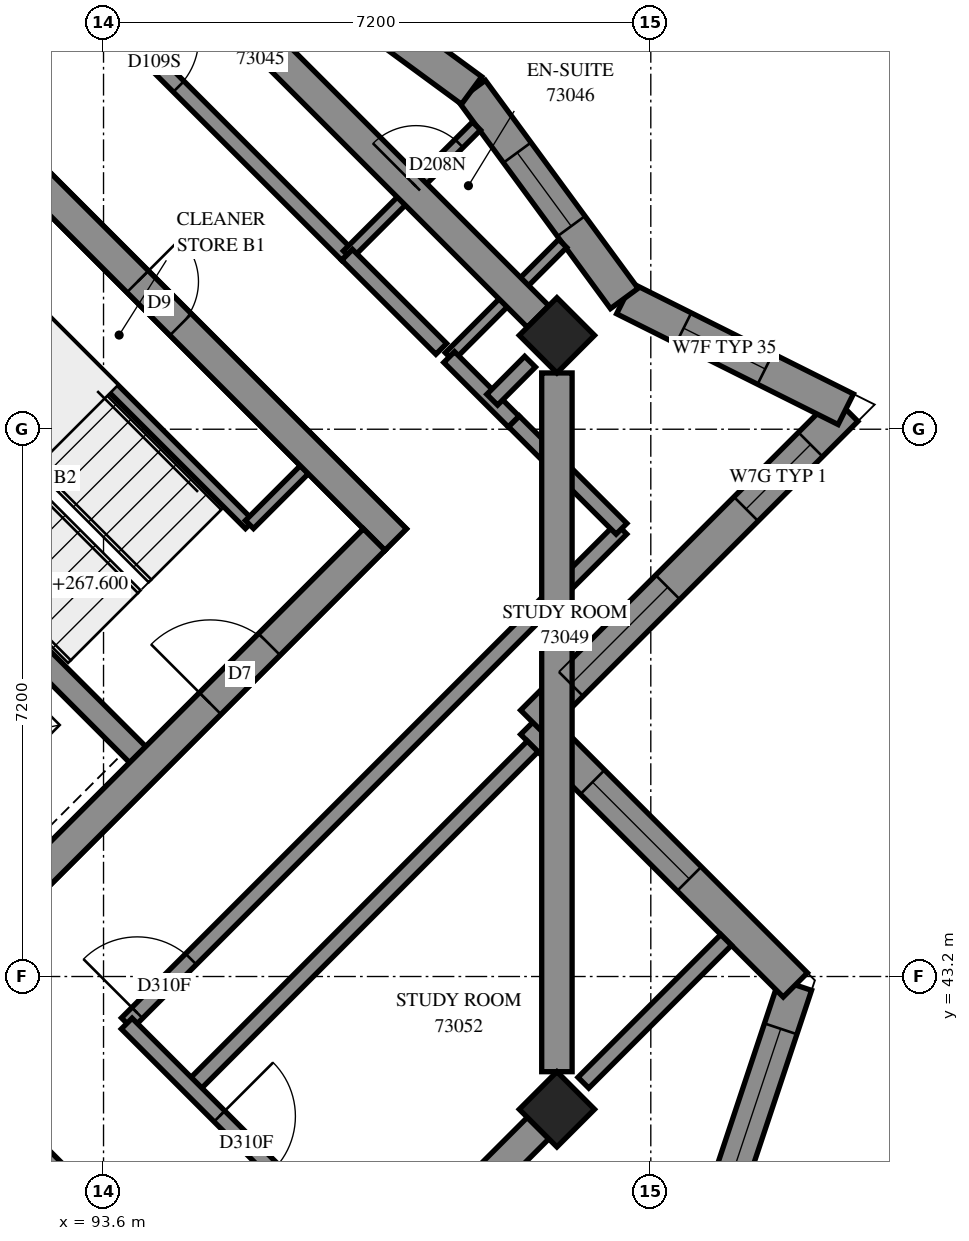
"""IFC4 building model, lengths in metres.
Left out: names, types, materials, properties, quantities, classifications, styles, units other than length and angle.
Written with IfcOpenShell. Run it as: python <this file> out.ifc"""

import sys

from ifc_helpers import new_model, si_unit, direction, frame, frame_2d, origin, origin_2d, place, context, subcontext, project, spatial, polyline, rectangle, outline, extrude, element, fill, save


model = new_model("IFC4")
c1 = context("Model", 3, precision=1e-05, world=origin(), true_north=direction((0.0, 1.0)))
c2 = subcontext(c1, "Body", "Model", "MODEL_VIEW")
j1 = project(units=[si_unit("LENGTHUNIT", "METRE"), si_unit("PLANEANGLEUNIT", "RADIAN")], contexts=[c1])
p1 = place(None, origin())
s1 = spatial("IfcSite", under=j1, at=p1, CompositionType="ELEMENT")
p2 = place(p1, origin())
s2 = spatial("IfcBuilding", under=s1, at=p2, CompositionType="ELEMENT")
p3 = place(p2, frame((0.0, 0.0, 267.6)))
s3 = spatial("IfcBuildingStorey", under=s2, at=p3, CompositionType="ELEMENT", Elevation=267.6)
for number, where, z_axis, x_axis in (
    (1, (99.565, 51.635, 0.0), (0.0, 0.0, 1.0), (0.707, -0.707, 0.0)),
    (2, (99.565, 41.453, 0.0), (0.0, 0.0, 1.0), (0.707, -0.707, 0.0)),
):
    element("IfcColumn", number, at=place(p3, frame(where, z_axis=z_axis, x_axis=x_axis)), inside=s3, PredefinedType="COLUMN", context=c2, shape_type="SweptSolid", body=[
        extrude(rectangle(XDim=0.7, YDim=0.7, at=origin_2d()), origin(), (0.0, 0.0, 1.0), 3.1),
    ])
p4 = place(p3, frame((86.695, 59.696, -0.3), z_axis=(0.0, 0.0, 1.0), x_axis=(0.7071100706, -0.7071034917, 0.0)))
e3 = element("IfcWall", 3, at=p4, inside=s3, PredefinedType="SHEAR", context=c2, shape_type="SweptSolid", body=[
    extrude(rectangle(XDim=15.2, YDim=0.4, at=frame_2d((7.6, 0.0))), origin(), (0.0, 0.0, 1.0), 2.7),
])
p5 = place(p4, frame((10.4, 0.0, 0.3)))
e4 = element("IfcOpeningElement", 4, at=p5, cuts=e3, PredefinedType="OPENING", context=c2, shape_type="SweptSolid", body=[
    extrude(rectangle(XDim=0.8, YDim=2.1, at=frame_2d((0.4, 1.05))), frame((0.0, 0.21, 0.0), z_axis=(0.0, -1.0, 0.0), x_axis=(1.0, 0.0, 0.0)), (0.0, 0.0, 1.0), 0.42),
])
p6 = place(p3, frame((86.978, 38.766, -0.3), z_axis=(0.0, 0.0, 1.0), x_axis=(0.7071067812, 0.7071067812, 0.0)))
e5 = element("IfcWall", 5, at=p6, inside=s3, PredefinedType="SHEAR", context=c2, shape_type="SweptSolid", body=[
    extrude(rectangle(XDim=14.4, YDim=0.4, at=frame_2d((7.2, 0.0))), origin(), (0.0, 0.0, 1.0), 2.7),
])
p7 = place(p6, frame((4.55, 0.0, 0.3)))
e6 = element("IfcOpeningElement", 6, at=p7, cuts=e5, PredefinedType="OPENING", context=c2, shape_type="SweptSolid", body=[
    extrude(rectangle(XDim=1.1, YDim=2.1, at=frame_2d((0.55, 1.05))), frame((0.0, 0.21, 0.0), z_axis=(0.0, -1.0, 0.0), x_axis=(1.0, 0.0, 0.0)), (0.0, 0.0, 1.0), 0.42),
])
p8 = place(p6, frame((11.35, 0.0, 0.3)))
e7 = element("IfcOpeningElement", 7, at=p8, cuts=e5, PredefinedType="OPENING", context=c2, shape_type="SweptSolid", body=[
    extrude(rectangle(XDim=1.1, YDim=2.1, at=frame_2d((0.55, 1.05))), frame((0.0, 0.21, 0.0), z_axis=(0.0, -1.0, 0.0), x_axis=(1.0, 0.0, 0.0)), (0.0, 0.0, 1.0), 0.42),
])
p9 = place(p3, frame((88.958, 51.211, 0.0), z_axis=(0.0, 0.0, 1.0), x_axis=(0.7070998367, -0.7071137256, 0.0)))
e8 = element("IfcWall", 8, at=p9, inside=s3, PredefinedType="SOLIDWALL", context=c2, shape_type="SweptSolid", body=[
    extrude(rectangle(XDim=7.2, YDim=0.3, at=frame_2d((3.6, 0.0))), origin(), (0.0, 0.0, 1.0), 3.1),
])
p10 = place(p3, frame((101.082, 38.232, 0.0), z_axis=(0.0, 0.0, 1.0), x_axis=(0.316227766, 0.9486832981, 0.0)))
e9 = element("IfcWall", 9, at=p10, inside=s3, PredefinedType="SOLIDWALL", context=c2, shape_type="SweptSolid", body=[
    extrude(outline(polyline([(-0.108, -0.225), (5.259, -0.225), (4.981, 0.225), (0.108, 0.225), (-0.108, -0.225)])), origin(), (0.0, 0.0, 1.0), 3.1),
])
p11 = place(p10, frame((1.711, 0.0, 0.45)))
e10 = element("IfcOpeningElement", 10, at=p11, cuts=e9, PredefinedType="OPENING", context=c2, shape_type="SweptSolid", body=[
    extrude(rectangle(XDim=2.8, YDim=2.55, at=frame_2d((1.4, 1.275))), frame((0.0, 0.235, 0.0), z_axis=(0.0, -1.0, 0.0), x_axis=(1.0, 0.0, 0.0)), (0.0, 0.0, 1.0), 0.47),
])
p12 = place(p3, frame((102.701, 43.089, 0.0), z_axis=(0.0, 0.0, 1.0), x_axis=(-0.7070965479, 0.7071170144, 0.0)))
e11 = element("IfcWall", 11, at=p12, inside=s3, PredefinedType="SOLIDWALL", context=c2, shape_type="SweptSolid", body=[
    extrude(outline(polyline([(-0.139, -0.225), (4.661, -0.225), (5.111, 0.225), (0.139, 0.225), (-0.139, -0.225)])), origin(), (0.0, 0.0, 1.0), 3.1),
])
p13 = place(p12, frame((1.974, 0.0, 0.6)))
e12 = element("IfcOpeningElement", 12, at=p13, cuts=e11, PredefinedType="OPENING", context=c2, shape_type="SweptSolid", body=[
    extrude(rectangle(XDim=1.8, YDim=1.9, at=frame_2d((0.9, 0.95))), frame((0.0, 0.235, 0.0), z_axis=(0.0, -1.0, 0.0), x_axis=(1.0, 0.0, 0.0)), (0.0, 0.0, 1.0), 0.47),
])
p14 = place(p3, frame((99.246, 46.544, 0.0), z_axis=(0.0, 0.0, 1.0), x_axis=(0.7071067812, 0.7071067812, 0.0)))
e13 = element("IfcWall", 13, at=p14, inside=s3, PredefinedType="SOLIDWALL", context=c2, shape_type="SweptSolid", body=[
    extrude(outline(polyline([(0.225, -0.225), (6.137, -0.225), (5.513, 0.225), (-0.225, 0.225), (0.225, -0.225)])), origin(), (0.0, 0.0, 1.0), 3.1),
])
p15 = place(p14, frame((0.713, 0.0, 0.6)))
e14 = element("IfcOpeningElement", 14, at=p15, cuts=e13, PredefinedType="OPENING", context=c2, shape_type="SweptSolid", body=[
    extrude(rectangle(XDim=1.8, YDim=1.9, at=frame_2d((0.9, 0.95))), frame((0.0, 0.235, 0.0), z_axis=(0.0, -1.0, 0.0), x_axis=(1.0, 0.0, 0.0)), (0.0, 0.0, 1.0), 0.47),
])
p16 = place(p14, frame((3.969, 0.0, 0.6)))
e15 = element("IfcOpeningElement", 15, at=p16, cuts=e13, PredefinedType="OPENING", context=c2, shape_type="SweptSolid", body=[
    extrude(rectangle(XDim=1.2, YDim=1.9, at=frame_2d((0.6, 0.95))), frame((0.0, 0.235, 0.0), z_axis=(0.0, -1.0, 0.0), x_axis=(1.0, 0.0, 0.0)), (0.0, 0.0, 1.0), 0.47),
])
p17 = place(p3, frame((103.365, 50.663, 0.0), z_axis=(0.0, 0.0, 1.0), x_axis=(-0.8944456039, 0.4471767677, 0.0)))
e16 = element("IfcWall", 16, at=p17, inside=s3, PredefinedType="SOLIDWALL", context=c2, shape_type="SweptSolid", body=[
    extrude(outline(polyline([(-0.312, -0.225), (3.204, -0.225), (3.313, 0.225), (0.312, 0.225), (-0.312, -0.225)])), origin(), (0.0, 0.0, 1.0), 3.1),
])
p18 = place(p17, frame((1.185, 0.0, 0.45)))
e17 = element("IfcOpeningElement", 17, at=p18, cuts=e16, PredefinedType="OPENING", context=c2, shape_type="SweptSolid", body=[
    extrude(rectangle(XDim=1.2, YDim=2.55, at=frame_2d((0.6, 1.275))), frame((0.0, 0.235, 0.0), z_axis=(0.0, -1.0, 0.0), x_axis=(1.0, 0.0, 0.0)), (0.0, 0.0, 1.0), 0.47),
])
p19 = place(p3, frame((100.451, 52.12, 0.0), z_axis=(0.0, 0.0, 1.0), x_axis=(-0.5916343714, 0.8062064069, 0.0)))
e18 = element("IfcWall", 18, at=p19, inside=s3, PredefinedType="SOLIDWALL", context=c2, shape_type="SweptSolid", body=[
    extrude(outline(polyline([(0.054, -0.225), (3.429, -0.225), (3.36, 0.225), (-0.054, 0.225), (0.054, -0.225)])), origin(), (0.0, 0.0, 1.0), 3.1),
])
p20 = place(p19, frame((1.18, 0.0, 0.45)))
e19 = element("IfcOpeningElement", 19, at=p20, cuts=e18, PredefinedType="OPENING", context=c2, shape_type="SweptSolid", body=[
    extrude(rectangle(XDim=1.2, YDim=2.55, at=frame_2d((0.6, 1.275))), frame((0.0, 0.235, 0.0), z_axis=(0.0, -1.0, 0.0), x_axis=(1.0, 0.0, 0.0)), (0.0, 0.0, 1.0), 0.47),
])
p21 = place(p3, frame((98.442, 54.857, 0.0), z_axis=(0.0, 0.0, 1.0), x_axis=(-0.806200528, 0.5916423825, 0.0)))
e20 = element("IfcWall", 20, at=p21, inside=s3, PredefinedType="SOLIDWALL", context=c2, shape_type="SweptSolid", body=[
    extrude(outline(polyline([(-0.035, -0.225), (3.34, -0.225), (3.409, 0.225), (0.035, 0.225), (-0.035, -0.225)])), origin(), (0.0, 0.0, 1.0), 3.1),
])
p22 = place(p21, frame((1.255, 0.0, 0.45)))
e21 = element("IfcOpeningElement", 21, at=p22, cuts=e20, PredefinedType="OPENING", context=c2, shape_type="SweptSolid", body=[
    extrude(rectangle(XDim=1.2, YDim=2.55, at=frame_2d((0.6, 1.275))), frame((0.0, 0.235, 0.0), z_axis=(0.0, -1.0, 0.0), x_axis=(1.0, 0.0, 0.0)), (0.0, 0.0, 1.0), 0.47),
])
p23 = place(p3, frame((91.313, 53.354, 0.0), z_axis=(0.0, 0.0, 1.0), x_axis=(0.7071067812, -0.7071067812, 0.0)))
e22 = element("IfcWall", 22, at=p23, inside=s3, PredefinedType="PARTITIONING", context=c2, shape_type="SweptSolid", body=[
    extrude(rectangle(XDim=5.95, YDim=0.15, at=frame_2d((2.975, 0.0))), origin(), (0.0, 0.0, 1.0), 3.1),
])
p24 = place(p3, frame((95.52, 49.146, 0.0), z_axis=(0.0, 0.0, 1.0), x_axis=(0.7071067812, 0.7071067812, 0.0)))
e23 = element("IfcWall", 23, at=p24, inside=s3, PredefinedType="PARTITIONING", context=c2, shape_type="SweptSolid", body=[
    extrude(rectangle(XDim=1.02, YDim=0.15, at=frame_2d((0.51, 0.0))), origin(), (0.0, 0.0, 1.0), 3.1),
])
p25 = place(p3, frame((93.907, 42.585, 0.0), z_axis=(0.0, 0.0, 1.0), x_axis=(0.7071067812, 0.7071067812, 0.0)))
e24 = element("IfcWall", 24, at=p25, inside=s3, PredefinedType="PARTITIONING", context=c2, shape_type="SweptSolid", body=[
    extrude(rectangle(XDim=9.201, YDim=0.2, at=frame_2d((4.601, 0.0))), origin(), (0.0, 0.0, 1.0), 3.1),
])
p26 = place(p25, frame((0.193, 0.0, 0.0)))
e25 = element("IfcOpeningElement", 25, at=p26, cuts=e24, PredefinedType="OPENING", context=c2, shape_type="SweptSolid", body=[
    extrude(rectangle(XDim=1.0, YDim=2.1, at=frame_2d((0.5, 1.05))), frame((0.0, 0.11, 0.0), z_axis=(0.0, -1.0, 0.0), x_axis=(1.0, 0.0, 0.0)), (0.0, 0.0, 1.0), 0.22),
])
p27 = place(p3, frame((94.755, 41.737, 0.0), z_axis=(0.0, 0.0, 1.0), x_axis=(0.7071146549, 0.7070989073, 0.0)))
e26 = element("IfcWall", 26, at=p27, inside=s3, PredefinedType="PARTITIONING", context=c2, shape_type="SweptSolid", body=[
    extrude(rectangle(XDim=6.35, YDim=0.2, at=frame_2d((3.175, 0.0))), origin(), (0.0, 0.0, 1.0), 3.1),
])
p28 = place(p3, frame((93.905, 42.581, 0.0), z_axis=(0.0, 0.0, 1.0), x_axis=(0.7071067812, -0.7071067812, 0.0)))
e27 = element("IfcWall", 27, at=p28, inside=s3, PredefinedType="PARTITIONING", context=c2, shape_type="SweptSolid", body=[
    extrude(rectangle(XDim=4.8, YDim=0.2, at=frame_2d((2.4, 0.0))), origin(), (0.0, 0.0, 1.0), 3.1),
])
p29 = place(p28, frame((1.725, 0.0, 0.0)))
e28 = element("IfcOpeningElement", 28, at=p29, cuts=e27, PredefinedType="OPENING", context=c2, shape_type="SweptSolid", body=[
    extrude(rectangle(XDim=1.0, YDim=2.1, at=frame_2d((0.5, 1.05))), frame((0.0, 0.11, 0.0), z_axis=(0.0, -1.0, 0.0), x_axis=(1.0, 0.0, 0.0)), (0.0, 0.0, 1.0), 0.22),
])
p30 = place(p3, frame((92.491, 41.167, 0.0), z_axis=(0.0, 0.0, 1.0), x_axis=(0.7071067812, -0.7071067812, 0.0)))
e29 = element("IfcWall", 29, at=p30, inside=s3, PredefinedType="PARTITIONING", context=c2, shape_type="SweptSolid", body=[
    extrude(rectangle(XDim=4.8, YDim=0.2, at=frame_2d((2.4, 0.0))), origin(), (0.0, 0.0, 1.0), 3.1),
])
p31 = place(p30, frame((1.725, 0.0, 0.0)))
e30 = element("IfcOpeningElement", 30, at=p31, cuts=e29, PredefinedType="OPENING", context=c2, shape_type="SweptSolid", body=[
    extrude(rectangle(XDim=1.0, YDim=2.1, at=frame_2d((0.5, 1.05))), frame((0.0, 0.11, 0.0), z_axis=(0.0, -1.0, 0.0), x_axis=(1.0, 0.0, 0.0)), (0.0, 0.0, 1.0), 0.22),
])
p32 = place(p3, frame((93.621, 55.875, 0.0), z_axis=(0.0, 0.0, 1.0), x_axis=(0.7071067812, -0.7071067812, 0.0)))
e31 = element("IfcWall", 31, at=p32, inside=s3, PredefinedType="PARTITIONING", context=c2, shape_type="SweptSolid", body=[
    extrude(rectangle(XDim=4.5, YDim=0.2, at=frame_2d((2.25, 0.0))), origin(), (0.0, 0.0, 1.0), 3.1),
])
p33 = place(p32, frame((0.467, 0.0, 0.0)))
e32 = element("IfcOpeningElement", 32, at=p33, cuts=e31, PredefinedType="OPENING", context=c2, shape_type="SweptSolid", body=[
    extrude(rectangle(XDim=0.9, YDim=2.1, at=frame_2d((0.45, 1.05))), frame((0.0, 0.11, 0.0), z_axis=(0.0, -1.0, 0.0), x_axis=(1.0, 0.0, 0.0)), (0.0, 0.0, 1.0), 0.22),
])
p34 = place(p3, frame((97.301, 39.191, 0.0), z_axis=(0.0, 0.0, 1.0), x_axis=(0.7071067812, 0.7071067812, 0.0)))
e33 = element("IfcWall", 33, at=p34, inside=s3, PredefinedType="PARTITIONING", context=c2, shape_type="SweptSolid", body=[
    extrude(rectangle(XDim=2.707, YDim=0.2, at=frame_2d((1.353, 0.0))), origin(), (0.0, 0.0, 1.0), 2.6),
])
p35 = place(p3, frame((99.913, 41.803, 0.0), z_axis=(0.0, 0.0, 1.0), x_axis=(0.7071067812, 0.7071067812, 0.0)))
e34 = element("IfcWall", 34, at=p35, inside=s3, PredefinedType="PARTITIONING", context=c2, shape_type="SweptSolid", body=[
    extrude(rectangle(XDim=2.656, YDim=0.2, at=frame_2d((1.328, 0.0))), origin(), (0.0, 0.0, 1.0), 3.1),
])
p36 = place(p3, frame((96.809, 52.693, 0.0), z_axis=(0.0, 0.0, 1.0), x_axis=(0.7075441989, 0.7066690927, 0.0)))
e35 = element("IfcWall", 35, at=p36, inside=s3, PredefinedType="PARTITIONING", context=c2, shape_type="SweptSolid", body=[
    extrude(rectangle(XDim=2.4, YDim=0.15, at=frame_2d((1.2, 0.0))), origin(), (0.0, 0.0, 1.0), 3.1),
])
p37 = place(p36, frame((1.275, 0.0, 0.0)))
e36 = element("IfcOpeningElement", 36, at=p37, cuts=e35, PredefinedType="OPENING", context=c2, shape_type="SweptSolid", body=[
    extrude(rectangle(XDim=0.8, YDim=2.1, at=frame_2d((0.4, 1.05))), frame((0.0, 0.085, 0.0), z_axis=(0.0, -1.0, 0.0), x_axis=(1.0, 0.0, 0.0)), (0.0, 0.0, 1.0), 0.17),
])
p38 = place(p3, frame((98.149, 51.353, 0.0), z_axis=(0.0, 0.0, 1.0), x_axis=(0.7070830723, 0.7071304893, 0.0)))
e37 = element("IfcWall", 37, at=p38, inside=s3, PredefinedType="PARTITIONING", context=c2, shape_type="SweptSolid", body=[
    extrude(rectangle(XDim=2.109, YDim=0.15, at=frame_2d((1.054, 0.0))), origin(), (0.0, 0.0, 1.0), 3.1),
])
p39 = place(p3, frame((98.998, 50.504, 0.0), z_axis=(0.0, 0.0, 1.0), x_axis=(0.7076063266, -0.7066068826, 0.0)))
e38 = element("IfcWall", 38, at=p39, inside=s3, PredefinedType="PARTITIONING", context=c2, shape_type="SweptSolid", body=[
    extrude(rectangle(XDim=2.001, YDim=0.2, at=frame_2d((1.001, 0.0))), origin(), (0.0, 0.0, 1.0), 3.1),
])
p40 = place(p3, frame((96.805, 52.695, 0.0), z_axis=(0.0, 0.0, 1.0), x_axis=(0.7073923078, -0.7068211392, 0.0)))
e39 = element("IfcWall", 39, at=p40, inside=s3, PredefinedType="PARTITIONING", context=c2, shape_type="SweptSolid", body=[
    extrude(rectangle(XDim=1.751, YDim=0.2, at=frame_2d((0.875, 0.0))), origin(), (0.0, 0.0, 1.0), 3.1),
])
p41 = place(p3, frame((98.147, 51.349, 0.0), z_axis=(0.0, 0.0, 1.0), x_axis=(0.7071067812, -0.7071067812, 0.0)))
e40 = element("IfcWall", 40, at=p41, inside=s3, PredefinedType="PARTITIONING", context=c2, shape_type="SweptSolid", body=[
    extrude(rectangle(XDim=1.199, YDim=0.2, at=frame_2d((0.6, 0.0))), origin(), (0.0, 0.0, 1.0), 3.1),
])
p42 = place(p3, frame((98.714, 50.788, 0.0), z_axis=(0.0, 0.0, 1.0), x_axis=(0.7056883165, 0.7085224061, 0.0)))
e41 = element("IfcWall", 41, at=p42, inside=s3, PredefinedType="PARTITIONING", context=c2, shape_type="SweptSolid", body=[
    extrude(rectangle(XDim=0.706, YDim=0.2, at=frame_2d((0.353, 0.0))), origin(), (0.0, 0.0, 1.0), 3.1),
])
p43 = place(p11, origin())
e42 = element("IfcWindow", 42, at=p43, inside=s3, PartitioningType="SINGLE_PANEL", PredefinedType="WINDOW", context=c2, shape_type="SweptSolid", body=[
    extrude(rectangle(XDim=2.8, YDim=2.55, at=frame_2d((1.4, 1.275))), frame((0.0, 0.205, 0.0), z_axis=(0.0, -1.0, 0.0), x_axis=(1.0, 0.0, 0.0)), (0.0, 0.0, 1.0), 0.06),
])
fill(e10, e42)
p44 = place(p13, origin())
e43 = element("IfcWindow", 43, at=p44, inside=s3, PartitioningType="SINGLE_PANEL", PredefinedType="WINDOW", context=c2, shape_type="SweptSolid", body=[
    extrude(rectangle(XDim=1.8, YDim=1.9, at=frame_2d((0.9, 0.95))), frame((0.0, 0.205, 0.0), z_axis=(0.0, -1.0, 0.0), x_axis=(1.0, 0.0, 0.0)), (0.0, 0.0, 1.0), 0.06),
])
fill(e12, e43)
p45 = place(p15, origin())
e44 = element("IfcWindow", 44, at=p45, inside=s3, PartitioningType="SINGLE_PANEL", PredefinedType="WINDOW", context=c2, shape_type="SweptSolid", body=[
    extrude(rectangle(XDim=1.8, YDim=1.9, at=frame_2d((0.9, 0.95))), frame((0.0, 0.205, 0.0), z_axis=(0.0, -1.0, 0.0), x_axis=(1.0, 0.0, 0.0)), (0.0, 0.0, 1.0), 0.06),
])
fill(e14, e44)
p46 = place(p16, origin())
e45 = element("IfcWindow", 45, at=p46, inside=s3, PartitioningType="SINGLE_PANEL", PredefinedType="WINDOW", context=c2, shape_type="SweptSolid", body=[
    extrude(rectangle(XDim=1.2, YDim=1.9, at=frame_2d((0.6, 0.95))), frame((0.0, 0.205, 0.0), z_axis=(0.0, -1.0, 0.0), x_axis=(1.0, 0.0, 0.0)), (0.0, 0.0, 1.0), 0.06),
])
fill(e15, e45)
p47 = place(p18, origin())
e46 = element("IfcWindow", 46, at=p47, inside=s3, PartitioningType="SINGLE_PANEL", PredefinedType="WINDOW", context=c2, shape_type="SweptSolid", body=[
    extrude(rectangle(XDim=1.2, YDim=2.55, at=frame_2d((0.6, 1.275))), frame((0.0, 0.205, 0.0), z_axis=(0.0, -1.0, 0.0), x_axis=(1.0, 0.0, 0.0)), (0.0, 0.0, 1.0), 0.06),
])
fill(e17, e46)
p48 = place(p20, origin())
e47 = element("IfcWindow", 47, at=p48, inside=s3, PartitioningType="SINGLE_PANEL", PredefinedType="WINDOW", context=c2, shape_type="SweptSolid", body=[
    extrude(rectangle(XDim=1.2, YDim=2.55, at=frame_2d((0.6, 1.275))), frame((0.0, 0.205, 0.0), z_axis=(0.0, -1.0, 0.0), x_axis=(1.0, 0.0, 0.0)), (0.0, 0.0, 1.0), 0.06),
])
fill(e19, e47)
p49 = place(p5, origin())
e48 = element("IfcDoor", 48, at=p49, inside=s3, OperationType="SINGLE_SWING_RIGHT", PredefinedType="DOOR", context=c2, shape_type="SweptSolid", body=[
    extrude(rectangle(XDim=0.8, YDim=2.1, at=frame_2d((0.4, 1.05))), frame((0.0, 0.025, 0.0), z_axis=(0.0, -1.0, 0.0), x_axis=(1.0, 0.0, 0.0)), (0.0, 0.0, 1.0), 0.05),
])
fill(e4, e48)
p50 = place(p8, origin())
e49 = element("IfcDoor", 49, at=p50, inside=s3, OperationType="SINGLE_SWING_RIGHT", PredefinedType="DOOR", context=c2, shape_type="SweptSolid", body=[
    extrude(rectangle(XDim=1.1, YDim=2.1, at=frame_2d((0.55, 1.05))), frame((0.0, 0.025, 0.0), z_axis=(0.0, -1.0, 0.0), x_axis=(1.0, 0.0, 0.0)), (0.0, 0.0, 1.0), 0.05),
])
fill(e7, e49)
p51 = place(p33, origin())
e50 = element("IfcDoor", 50, at=p51, inside=s3, OperationType="SINGLE_SWING_LEFT", PredefinedType="DOOR", context=c2, shape_type="SweptSolid", body=[
    extrude(rectangle(XDim=0.9, YDim=2.1, at=frame_2d((0.45, 1.05))), frame((0.0, 0.025, 0.0), z_axis=(0.0, -1.0, 0.0), x_axis=(1.0, 0.0, 0.0)), (0.0, 0.0, 1.0), 0.05),
])
fill(e32, e50)
p52 = place(p37, origin())
e51 = element("IfcDoor", 51, at=p52, inside=s3, OperationType="SINGLE_SWING_RIGHT", PredefinedType="DOOR", context=c2, shape_type="SweptSolid", body=[
    extrude(rectangle(XDim=0.8, YDim=2.1, at=frame_2d((0.4, 1.05))), frame((0.0, 0.025, 0.0), z_axis=(0.0, -1.0, 0.0), x_axis=(1.0, 0.0, 0.0)), (0.0, 0.0, 1.0), 0.05),
])
fill(e36, e51)
p53 = place(p26, origin())
e52 = element("IfcDoor", 52, at=p53, inside=s3, OperationType="SINGLE_SWING_LEFT", PredefinedType="DOOR", context=c2, shape_type="SweptSolid", body=[
    extrude(rectangle(XDim=1.0, YDim=2.1, at=frame_2d((0.5, 1.05))), frame((0.0, 0.025, 0.0), z_axis=(0.0, -1.0, 0.0), x_axis=(1.0, 0.0, 0.0)), (0.0, 0.0, 1.0), 0.05),
])
fill(e25, e52)
p54 = place(p29, origin())
e53 = element("IfcDoor", 53, at=p54, inside=s3, OperationType="SINGLE_SWING_RIGHT", PredefinedType="DOOR", context=c2, shape_type="SweptSolid", body=[
    extrude(rectangle(XDim=1.0, YDim=2.1, at=frame_2d((0.5, 1.05))), frame((0.0, 0.025, 0.0), z_axis=(0.0, -1.0, 0.0), x_axis=(1.0, 0.0, 0.0)), (0.0, 0.0, 1.0), 0.05),
])
fill(e28, e53)
save(model, sys.argv[1])
